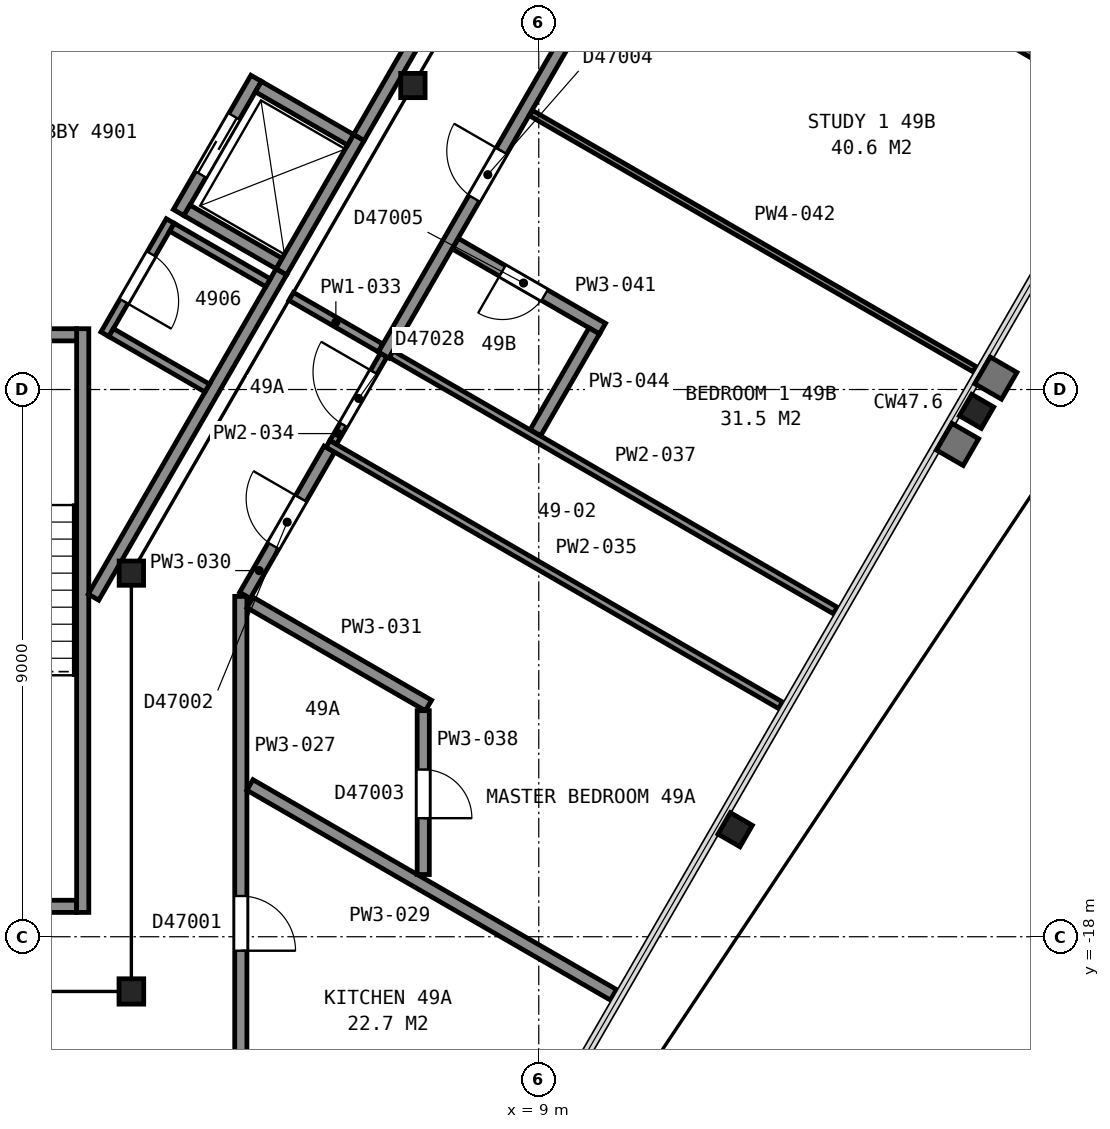
"""IFC4 building model, lengths in metres.
Left out: names, types, materials, properties, quantities, classifications, styles, units other than length and angle.
Written with IfcOpenShell. Run it as: python <this file> out.ifc"""

import sys

from ifc_helpers import new_model, si_unit, direction, frame, frame_2d, origin, origin_2d, place, context, subcontext, project, spatial, rectangle, i_section, extrude, element, fill, save


model = new_model("IFC4")
c1 = context("Model", 3, precision=1e-05, world=origin(), true_north=direction((0.0, 1.0)))
c2 = subcontext(c1, "Body", "Model", "MODEL_VIEW")
j1 = project(units=[si_unit("LENGTHUNIT", "METRE"), si_unit("PLANEANGLEUNIT", "RADIAN")], contexts=[c1])
p1 = place(None, origin())
s1 = spatial("IfcSite", under=j1, at=p1, CompositionType="ELEMENT")
p2 = place(p1, origin())
s2 = spatial("IfcBuilding", under=s1, at=p2, CompositionType="ELEMENT")
p3 = place(p2, frame((0.0, 0.0, 196.9)))
s3 = spatial("IfcBuildingStorey", under=s2, at=p3, CompositionType="ELEMENT", Elevation=196.9)
for number, where, z_axis, x_axis in (
    (1, (12.23, -16.24, 0.0), (0.0, 0.0, 1.0), (-0.5, -0.866, 0.0)),
    (2, (16.2, -9.36, 0.0), (0.0, 0.0, 1.0), (-0.5, -0.866, 0.0)),
):
    element("IfcColumn", number, at=place(p3, frame(where, z_axis=z_axis, x_axis=x_axis)), inside=s3, PredefinedType="COLUMN", context=c2, shape_type="SweptSolid", body=[
        extrude(i_section(OverallWidth=0.406, OverallDepth=0.417, WebThickness=0.03, FlangeThickness=0.048, FilletRadius=0.015, at=origin_2d()), origin(), (0.0, 0.0, 1.0), 3.01),
    ])
p4 = place(p3, frame((2.3, -18.9, 0.0), z_axis=(0.0, 0.0, 1.0), x_axis=(-1.0, 0.0, 0.0)))
e3 = element("IfcColumn", 3, at=p4, inside=s3, PredefinedType="COLUMN", context=c2, shape_type="SweptSolid", body=[
    extrude(i_section(OverallWidth=0.406, OverallDepth=0.417, WebThickness=0.03, FlangeThickness=0.048, FilletRadius=0.015, at=origin_2d()), origin(), (0.0, 0.0, 1.0), 3.7),
])
for number, where, z_axis, x_axis in (
    (4, (2.3, -12.02, 0.0), (0.0, 0.0, 1.0), (1.0, 0.0, 0.0)),
    (5, (6.93, -4.0, 0.0), (0.0, 0.0, 1.0), (1.0, 0.0, 0.0)),
):
    element("IfcColumn", number, at=place(p3, frame(where, z_axis=z_axis, x_axis=x_axis)), inside=s3, PredefinedType="COLUMN", context=c2, shape_type="SweptSolid", body=[
        extrude(i_section(OverallWidth=0.401, OverallDepth=0.399, WebThickness=0.025, FlangeThickness=0.04, FilletRadius=0.015, at=origin_2d()), origin(), (0.0, 0.0, 1.0), 3.7),
    ])
p5 = place(p3, frame((-1.4, -17.5, 0.0), z_axis=(0.0, 0.0, 1.0), x_axis=(1.0, 0.0, 0.0)))
e6 = element("IfcWall", 6, at=p5, inside=s3, PredefinedType="PARTITIONING", context=c2, shape_type="SweptSolid", body=[
    extrude(rectangle(XDim=2.8, YDim=0.2, at=frame_2d((1.4, 0.0))), origin(), (0.0, 0.0, 1.0), 3.45),
])
p6 = place(p5, frame((0.85, 0.0, 0.0)))
e7 = element("IfcOpeningElement", 7, at=p6, cuts=e6, PredefinedType="OPENING", context=c2, shape_type="SweptSolid", body=[
    extrude(rectangle(XDim=1.1, YDim=2.1, at=frame_2d((0.55, 1.05))), frame((0.0, 0.11, 0.0), z_axis=(0.0, -1.0, 0.0), x_axis=(1.0, 0.0, 0.0)), (0.0, 0.0, 1.0), 0.22),
])
p7 = place(p3, frame((1.5, -8.0, 0.0), z_axis=(0.0, 0.0, 1.0), x_axis=(0.0, -1.0, 0.0)))
e8 = element("IfcWall", 8, at=p7, inside=s3, PredefinedType="PARTITIONING", context=c2, shape_type="SweptSolid", body=[
    extrude(rectangle(XDim=9.6, YDim=0.2, at=frame_2d((4.8, 0.0))), origin(), (0.0, 0.0, 1.0), 3.45),
])
p8 = place(p3, frame((-1.4, -8.1, 0.0), z_axis=(0.0, 0.0, 1.0), x_axis=(1.0, 0.0, 0.0)))
e9 = element("IfcWall", 9, at=p8, inside=s3, PredefinedType="PARTITIONING", context=c2, shape_type="SweptSolid", body=[
    extrude(rectangle(XDim=2.8, YDim=0.2, at=frame_2d((1.4, 0.0))), origin(), (0.0, 0.0, 1.0), 3.45),
])
p9 = place(p3, frame((4.766, -7.065, 0.0), z_axis=(0.0, 0.0, 1.0), x_axis=(0.499948979701, 0.866054858364, 0.0)))
e10 = element("IfcWall", 10, at=p9, inside=s3, PredefinedType="PARTITIONING", context=c2, shape_type="SweptSolid", body=[
    extrude(rectangle(XDim=2.55, YDim=0.2, at=frame_2d((1.275, 0.0))), origin(), (0.0, 0.0, 1.0), 3.7),
])
p10 = place(p3, frame((3.077, -6.09, 0.0), z_axis=(0.0, 0.0, 1.0), x_axis=(0.500062241894, 0.865989465428, 0.0)))
e11 = element("IfcWall", 11, at=p10, inside=s3, PredefinedType="PARTITIONING", context=c2, shape_type="SweptSolid", body=[
    extrude(rectangle(XDim=2.55, YDim=0.2, at=frame_2d((1.275, 0.0))), origin(), (0.0, 0.0, 1.0), 3.7),
])
p11 = place(p10, frame((0.725, 0.0, 0.0)))
e12 = element("IfcOpeningElement", 12, at=p11, cuts=e11, PredefinedType="OPENING", context=c2, shape_type="SweptSolid", body=[
    extrude(rectangle(XDim=1.1, YDim=2.1, at=frame_2d((0.55, 1.05))), frame((0.0, 0.11, 0.0), z_axis=(0.0, -1.0, 0.0), x_axis=(1.0, 0.0, 0.0)), (0.0, 0.0, 1.0), 0.22),
])
p12 = place(p3, frame((5.905, -4.893, 0.0), z_axis=(0.0, 0.0, 1.0), x_axis=(-0.866002029911, 0.500040482552, 0.0)))
e13 = element("IfcWall", 13, at=p12, inside=s3, PredefinedType="PARTITIONING", context=c2, shape_type="SweptSolid", body=[
    extrude(rectangle(XDim=1.75, YDim=0.2, at=frame_2d((0.875, 0.0))), origin(), (0.0, 0.0, 1.0), 3.7),
])
p13 = place(p3, frame((4.73, -6.928, 0.0), z_axis=(0.0, 0.0, 1.0), x_axis=(-0.866036909293, 0.499980071345, 0.0)))
e14 = element("IfcWall", 14, at=p13, inside=s3, PredefinedType="PARTITIONING", context=c2, shape_type="SweptSolid", body=[
    extrude(rectangle(XDim=1.75, YDim=0.2, at=frame_2d((0.875, 0.0))), origin(), (0.0, 0.0, 1.0), 3.7),
])
p14 = place(p3, frame((1.677, -12.415, 0.0), z_axis=(0.0, 0.0, 1.0), x_axis=(0.500054337157, 0.865994029939, 0.0)))
e15 = element("IfcWall", 15, at=p14, inside=s3, PredefinedType="PARTITIONING", context=c2, shape_type="SweptSolid", body=[
    extrude(rectangle(XDim=6.177, YDim=0.2, at=frame_2d((3.088, 0.0))), origin(), (0.0, 0.0, 1.0), 3.45),
])
p15 = place(p3, frame((2.939, -6.229, 0.0), z_axis=(0.0, 0.0, 1.0), x_axis=(-0.499961633463, -0.866047553582, 0.0)))
e16 = element("IfcWall", 16, at=p15, inside=s3, PredefinedType="PARTITIONING", context=c2, shape_type="SweptSolid", body=[
    extrude(rectangle(XDim=2.15, YDim=0.15, at=frame_2d((1.075, 0.0))), origin(), (0.0, 0.0, 1.0), 3.45),
])
p16 = place(p15, frame((0.625, 0.0, 0.0)))
e17 = element("IfcOpeningElement", 17, at=p16, cuts=e16, PredefinedType="OPENING", context=c2, shape_type="SweptSolid", body=[
    extrude(rectangle(XDim=0.9, YDim=2.1, at=frame_2d((0.45, 1.05))), frame((0.0, 0.085, 0.0), z_axis=(0.0, -1.0, 0.0), x_axis=(1.0, 0.0, 0.0)), (0.0, 0.0, 1.0), 0.17),
])
p17 = place(p3, frame((1.967, -8.063, 0.0), z_axis=(0.0, 0.0, 1.0), x_axis=(0.865978377894, -0.500081442387, 0.0)))
e18 = element("IfcWall", 18, at=p17, inside=s3, PredefinedType="PARTITIONING", context=c2, shape_type="SweptSolid", body=[
    extrude(rectangle(XDim=1.825, YDim=0.15, at=frame_2d((0.913, 0.0))), origin(), (0.0, 0.0, 1.0), 3.45),
])
p18 = place(p3, frame((2.967, -6.332, 0.0), z_axis=(0.0, 0.0, 1.0), x_axis=(0.866036312054, -0.499981105847, 0.0)))
e19 = element("IfcWall", 19, at=p18, inside=s3, PredefinedType="PARTITIONING", context=c2, shape_type="SweptSolid", body=[
    extrude(rectangle(XDim=1.825, YDim=0.15, at=frame_2d((0.912, 0.0))), origin(), (0.0, 0.0, 1.0), 3.45),
])
p19 = place(p3, frame((6.042, -4.855, 0.0), z_axis=(0.0, 0.0, 1.0), x_axis=(0.500252727967, 0.865879442048, 0.0)))
e20 = element("IfcWall", 20, at=p19, inside=s3, PredefinedType="PARTITIONING", context=c2, shape_type="SweptSolid", body=[
    extrude(rectangle(XDim=2.617, YDim=0.2, at=frame_2d((1.309, 0.0))), origin(), (0.0, 0.0, 1.0), 3.45),
])
p20 = place(p3, frame((4.1, -12.402, 0.0), z_axis=(0.0, 0.0, 1.0), x_axis=(0.0, -1.0, 0.0)))
e21 = element("IfcWall", 21, at=p20, inside=s3, PredefinedType="PARTITIONING", context=c2, shape_type="SweptSolid", body=[
    extrude(rectangle(XDim=8.248, YDim=0.2, at=frame_2d((4.124, 0.0))), origin(), (0.0, 0.0, 1.0), 2.362),
])
p21 = place(p20, frame((4.928, 0.0, 0.0)))
e22 = element("IfcOpeningElement", 22, at=p21, cuts=e21, PredefinedType="OPENING", context=c2, shape_type="SweptSolid", body=[
    extrude(rectangle(XDim=0.9, YDim=2.1, at=frame_2d((0.45, 1.05))), frame((0.0, 0.11, 0.0), z_axis=(0.0, -1.0, 0.0), x_axis=(1.0, 0.0, 0.0)), (0.0, 0.0, 1.0), 0.22),
])
p22 = place(p3, frame((4.25, -15.504, 0.0), z_axis=(0.0, 0.0, 1.0), x_axis=(0.866025383743, -0.500000034713, 0.0)))
e23 = element("IfcWall", 23, at=p22, inside=s3, PredefinedType="PARTITIONING", context=c2, shape_type="SweptSolid", body=[
    extrude(rectangle(XDim=6.903, YDim=0.2, at=frame_2d((3.451, 0.0))), origin(), (0.0, 0.0, 1.0), 2.362),
])
p23 = place(p3, frame((5.556, -9.98, 0.0), z_axis=(0.0, 0.0, 1.0), x_axis=(-0.499940639567, -0.866059672834, 0.0)))
e24 = element("IfcWall", 24, at=p23, inside=s3, PredefinedType="PARTITIONING", context=c2, shape_type="SweptSolid", body=[
    extrude(rectangle(XDim=2.777, YDim=0.2, at=frame_2d((1.388, 0.0))), origin(), (0.0, 0.0, 1.0), 2.362),
])
p24 = place(p23, frame((0.937, 0.0, 0.0)))
e25 = element("IfcOpeningElement", 25, at=p24, cuts=e24, PredefinedType="OPENING", context=c2, shape_type="SweptSolid", body=[
    extrude(rectangle(XDim=0.9, YDim=2.1, at=frame_2d((0.45, 1.05))), frame((0.0, 0.11, 0.0), z_axis=(0.0, -1.0, 0.0), x_axis=(1.0, 0.0, 0.0)), (0.0, 0.0, 1.0), 0.22),
])
p25 = place(p3, frame((4.25, -12.502, 0.0), z_axis=(0.0, 0.0, 1.0), x_axis=(0.866032087317, -0.499988423603, 0.0)))
e26 = element("IfcWall", 26, at=p25, inside=s3, PredefinedType="PARTITIONING", context=c2, shape_type="SweptSolid", body=[
    extrude(rectangle(XDim=3.39, YDim=0.2, at=frame_2d((1.695, 0.0))), origin(), (0.0, 0.0, 1.0), 2.362),
])
p26 = place(p3, frame((4.928, -7.468, 0.0), z_axis=(0.0, 0.0, 1.0), x_axis=(0.866075426483, -0.499913348133, 0.0)))
e27 = element("IfcWall", 27, at=p26, inside=s3, PredefinedType="PARTITIONING", context=c2, shape_type="SweptSolid", body=[
    extrude(rectangle(XDim=1.698, YDim=0.15, at=frame_2d((0.849, 0.0))), origin(), (0.0, 0.0, 1.0), 2.362),
])
p27 = place(p3, frame((5.62, -9.87, 0.0), z_axis=(0.0, 0.0, 1.0), x_axis=(0.500142759665, 0.865942965763, 0.0)))
e28 = element("IfcWall", 28, at=p27, inside=s3, PredefinedType="PARTITIONING", context=c2, shape_type="SweptSolid", body=[
    extrude(rectangle(XDim=1.659, YDim=0.125, at=frame_2d((0.83, 0.0))), origin(), (0.0, 0.0, 1.0), 2.362),
])
p28 = place(p27, frame((0.335, 0.0, 0.0)))
e29 = element("IfcOpeningElement", 29, at=p28, cuts=e28, PredefinedType="OPENING", context=c2, shape_type="SweptSolid", body=[
    extrude(rectangle(XDim=1.0, YDim=2.1, at=frame_2d((0.5, 1.05))), frame((0.0, 0.073, 0.0), z_axis=(0.0, -1.0, 0.0), x_axis=(1.0, 0.0, 0.0)), (0.0, 0.0, 1.0), 0.145),
])
p29 = place(p3, frame((5.533, -9.895, 0.0), z_axis=(0.0, 0.0, 1.0), x_axis=(0.865995449608, -0.500051878567, 0.0)))
e30 = element("IfcWall", 30, at=p29, inside=s3, PredefinedType="PARTITIONING", context=c2, shape_type="SweptSolid", body=[
    extrude(rectangle(XDim=8.596, YDim=0.125, at=frame_2d((4.298, 0.0))), origin(), (0.0, 0.0, 1.0), 2.362),
])
p30 = place(p3, frame((12.903, 2.745, 0.0), z_axis=(0.0, 0.0, 1.0), x_axis=(-0.499992063946, -0.866029985619, 0.0)))
e31 = element("IfcWall", 31, at=p30, inside=s3, PredefinedType="PARTITIONING", context=c2, shape_type="SweptSolid", body=[
    extrude(rectangle(XDim=12.907, YDim=0.2, at=frame_2d((6.454, 0.0))), origin(), (0.0, 0.0, 1.0), 2.362),
])
p31 = place(p30, frame((9.032, 0.0, 0.0)))
e32 = element("IfcOpeningElement", 32, at=p31, cuts=e31, PredefinedType="OPENING", context=c2, shape_type="SweptSolid", body=[
    extrude(rectangle(XDim=0.9, YDim=2.1, at=frame_2d((0.45, 1.05))), frame((0.0, 0.11, 0.0), z_axis=(0.0, -1.0, 0.0), x_axis=(1.0, 0.0, 0.0)), (0.0, 0.0, 1.0), 0.22),
])
p32 = place(p30, frame((5.349, 0.0, 0.0)))
e33 = element("IfcOpeningElement", 33, at=p32, cuts=e31, PredefinedType="OPENING", context=c2, shape_type="SweptSolid", body=[
    extrude(rectangle(XDim=0.9, YDim=2.1, at=frame_2d((0.45, 1.05))), frame((0.0, 0.11, 0.0), z_axis=(0.0, -1.0, 0.0), x_axis=(1.0, 0.0, 0.0)), (0.0, 0.0, 1.0), 0.22),
])
p33 = place(p3, frame((6.576, -8.419, 0.0), z_axis=(0.0, 0.0, 1.0), x_axis=(0.866048155274, -0.499960591193, 0.0)))
e34 = element("IfcWall", 34, at=p33, inside=s3, PredefinedType="PARTITIONING", context=c2, shape_type="SweptSolid", body=[
    extrude(rectangle(XDim=8.431, YDim=0.125, at=frame_2d((4.215, 0.0))), origin(), (0.0, 0.0, 1.0), 2.362),
])
p34 = place(p3, frame((7.1, -16.977, 0.0), z_axis=(0.0, 0.0, 1.0), x_axis=(0.0, 1.0, 0.0)))
e35 = element("IfcWall", 35, at=p34, inside=s3, PredefinedType="PARTITIONING", context=c2, shape_type="SweptSolid", body=[
    extrude(rectangle(XDim=2.695, YDim=0.2, at=frame_2d((1.347, 0.0))), origin(), (0.0, 0.0, 1.0), 2.362),
])
p35 = place(p34, frame((0.927, 0.0, 0.0)))
e36 = element("IfcOpeningElement", 36, at=p35, cuts=e35, PredefinedType="OPENING", context=c2, shape_type="SweptSolid", body=[
    extrude(rectangle(XDim=0.8, YDim=2.1, at=frame_2d((0.4, 1.05))), frame((0.0, 0.11, 0.0), z_axis=(0.0, -1.0, 0.0), x_axis=(1.0, 0.0, 0.0)), (0.0, 0.0, 1.0), 0.22),
])
p36 = place(p3, frame((10.049, -7.999, 0.0), z_axis=(0.0, 0.0, 1.0), x_axis=(-0.866041588165, 0.499971966783, 0.0)))
e37 = element("IfcWall", 37, at=p36, inside=s3, PredefinedType="PARTITIONING", context=c2, shape_type="SweptSolid", body=[
    extrude(rectangle(XDim=2.795, YDim=0.2, at=frame_2d((1.397, 0.0))), origin(), (0.0, 0.0, 1.0), 2.362),
])
p37 = place(p36, frame((1.1, 0.0, 0.0)))
e38 = element("IfcOpeningElement", 38, at=p37, cuts=e37, PredefinedType="OPENING", context=c2, shape_type="SweptSolid", body=[
    extrude(rectangle(XDim=0.8, YDim=2.1, at=frame_2d((0.4, 1.05))), frame((0.0, 0.11, 0.0), z_axis=(0.0, -1.0, 0.0), x_axis=(1.0, 0.0, 0.0)), (0.0, 0.0, 1.0), 0.22),
])
p38 = place(p3, frame((8.869, -4.451, 0.0), z_axis=(0.0, 0.0, 1.0), x_axis=(0.866027858276, -0.499995748672, 0.0)))
e39 = element("IfcWall", 39, at=p38, inside=s3, PredefinedType="PARTITIONING", context=c2, shape_type="SweptSolid", body=[
    extrude(rectangle(XDim=8.429, YDim=0.1, at=frame_2d((4.214, 0.0))), origin(), (0.0, 0.0, 1.0), 2.362),
])
p39 = place(p3, frame((8.946, -9.709, 0.0), z_axis=(0.0, 0.0, 1.0), x_axis=(0.499970304126, 0.866042548026, 0.0)))
e40 = element("IfcWall", 40, at=p39, inside=s3, PredefinedType="PARTITIONING", context=c2, shape_type="SweptSolid", body=[
    extrude(rectangle(XDim=1.933, YDim=0.2, at=frame_2d((0.966, 0.0))), origin(), (0.0, 0.0, 1.0), 2.362),
])
p40 = place(p3, frame((11.343, -0.166, 0.0), z_axis=(0.0, 0.0, 1.0), x_axis=(0.866022557401, -0.500004930048, 0.0)))
e41 = element("IfcWall", 41, at=p40, inside=s3, PredefinedType="PARTITIONING", context=c2, shape_type="SweptSolid", body=[
    extrude(rectangle(XDim=8.429, YDim=0.1, at=frame_2d((4.215, 0.0))), origin(), (0.0, 0.0, 1.0), 2.362),
])
p41 = place(p11, origin())
e42 = element("IfcDoor", 42, at=p41, inside=s3, OperationType="SLIDING_TO_LEFT", PredefinedType="DOOR", context=c2, shape_type="SweptSolid", body=[
    extrude(rectangle(XDim=1.1, YDim=2.1, at=frame_2d((0.55, 1.05))), frame((0.0, 0.025, 0.0), z_axis=(0.0, -1.0, 0.0), x_axis=(1.0, 0.0, 0.0)), (0.0, 0.0, 1.0), 0.05),
])
fill(e12, e42)
p42 = place(p16, origin())
e43 = element("IfcDoor", 43, at=p42, inside=s3, OperationType="SINGLE_SWING_RIGHT", PredefinedType="DOOR", context=c2, shape_type="SweptSolid", body=[
    extrude(rectangle(XDim=0.9, YDim=2.1, at=frame_2d((0.45, 1.05))), frame((0.0, 0.025, 0.0), z_axis=(0.0, -1.0, 0.0), x_axis=(1.0, 0.0, 0.0)), (0.0, 0.0, 1.0), 0.05),
])
fill(e17, e43)
p43 = place(p21, origin())
e44 = element("IfcDoor", 44, at=p43, inside=s3, OperationType="SINGLE_SWING_RIGHT", PredefinedType="DOOR", context=c2, shape_type="SweptSolid", body=[
    extrude(rectangle(XDim=0.9, YDim=2.1, at=frame_2d((0.45, 1.05))), frame((0.0, 0.025, 0.0), z_axis=(0.0, -1.0, 0.0), x_axis=(1.0, 0.0, 0.0)), (0.0, 0.0, 1.0), 0.05),
])
fill(e22, e44)
p44 = place(p24, origin())
e45 = element("IfcDoor", 45, at=p44, inside=s3, OperationType="SINGLE_SWING_LEFT", PredefinedType="DOOR", context=c2, shape_type="SweptSolid", body=[
    extrude(rectangle(XDim=0.9, YDim=2.1, at=frame_2d((0.45, 1.05))), frame((0.0, 0.025, 0.0), z_axis=(0.0, -1.0, 0.0), x_axis=(1.0, 0.0, 0.0)), (0.0, 0.0, 1.0), 0.05),
])
fill(e25, e45)
p45 = place(p28, origin())
e46 = element("IfcDoor", 46, at=p45, inside=s3, OperationType="SINGLE_SWING_RIGHT", PredefinedType="DOOR", context=c2, shape_type="SweptSolid", body=[
    extrude(rectangle(XDim=1.0, YDim=2.1, at=frame_2d((0.5, 1.05))), frame((0.0, 0.025, 0.0), z_axis=(0.0, -1.0, 0.0), x_axis=(1.0, 0.0, 0.0)), (0.0, 0.0, 1.0), 0.05),
])
fill(e29, e46)
p46 = place(p31, origin())
e47 = element("IfcDoor", 47, at=p46, inside=s3, OperationType="SINGLE_SWING_LEFT", PredefinedType="DOOR", context=c2, shape_type="SweptSolid", body=[
    extrude(rectangle(XDim=0.9, YDim=2.1, at=frame_2d((0.45, 1.05))), frame((0.0, 0.025, 0.0), z_axis=(0.0, -1.0, 0.0), x_axis=(1.0, 0.0, 0.0)), (0.0, 0.0, 1.0), 0.05),
])
fill(e32, e47)
p47 = place(p35, origin())
e48 = element("IfcDoor", 48, at=p47, inside=s3, OperationType="SINGLE_SWING_LEFT", PredefinedType="DOOR", context=c2, shape_type="SweptSolid", body=[
    extrude(rectangle(XDim=0.8, YDim=2.1, at=frame_2d((0.4, 1.05))), frame((0.0, 0.025, 0.0), z_axis=(0.0, -1.0, 0.0), x_axis=(1.0, 0.0, 0.0)), (0.0, 0.0, 1.0), 0.05),
])
fill(e36, e48)
p48 = place(p37, origin())
e49 = element("IfcDoor", 49, at=p48, inside=s3, OperationType="SINGLE_SWING_RIGHT", PredefinedType="DOOR", context=c2, shape_type="SweptSolid", body=[
    extrude(rectangle(XDim=0.8, YDim=2.1, at=frame_2d((0.4, 1.05))), frame((0.0, 0.025, 0.0), z_axis=(0.0, -1.0, 0.0), x_axis=(1.0, 0.0, 0.0)), (0.0, 0.0, 1.0), 0.05),
])
fill(e38, e49)
save(model, sys.argv[1])
